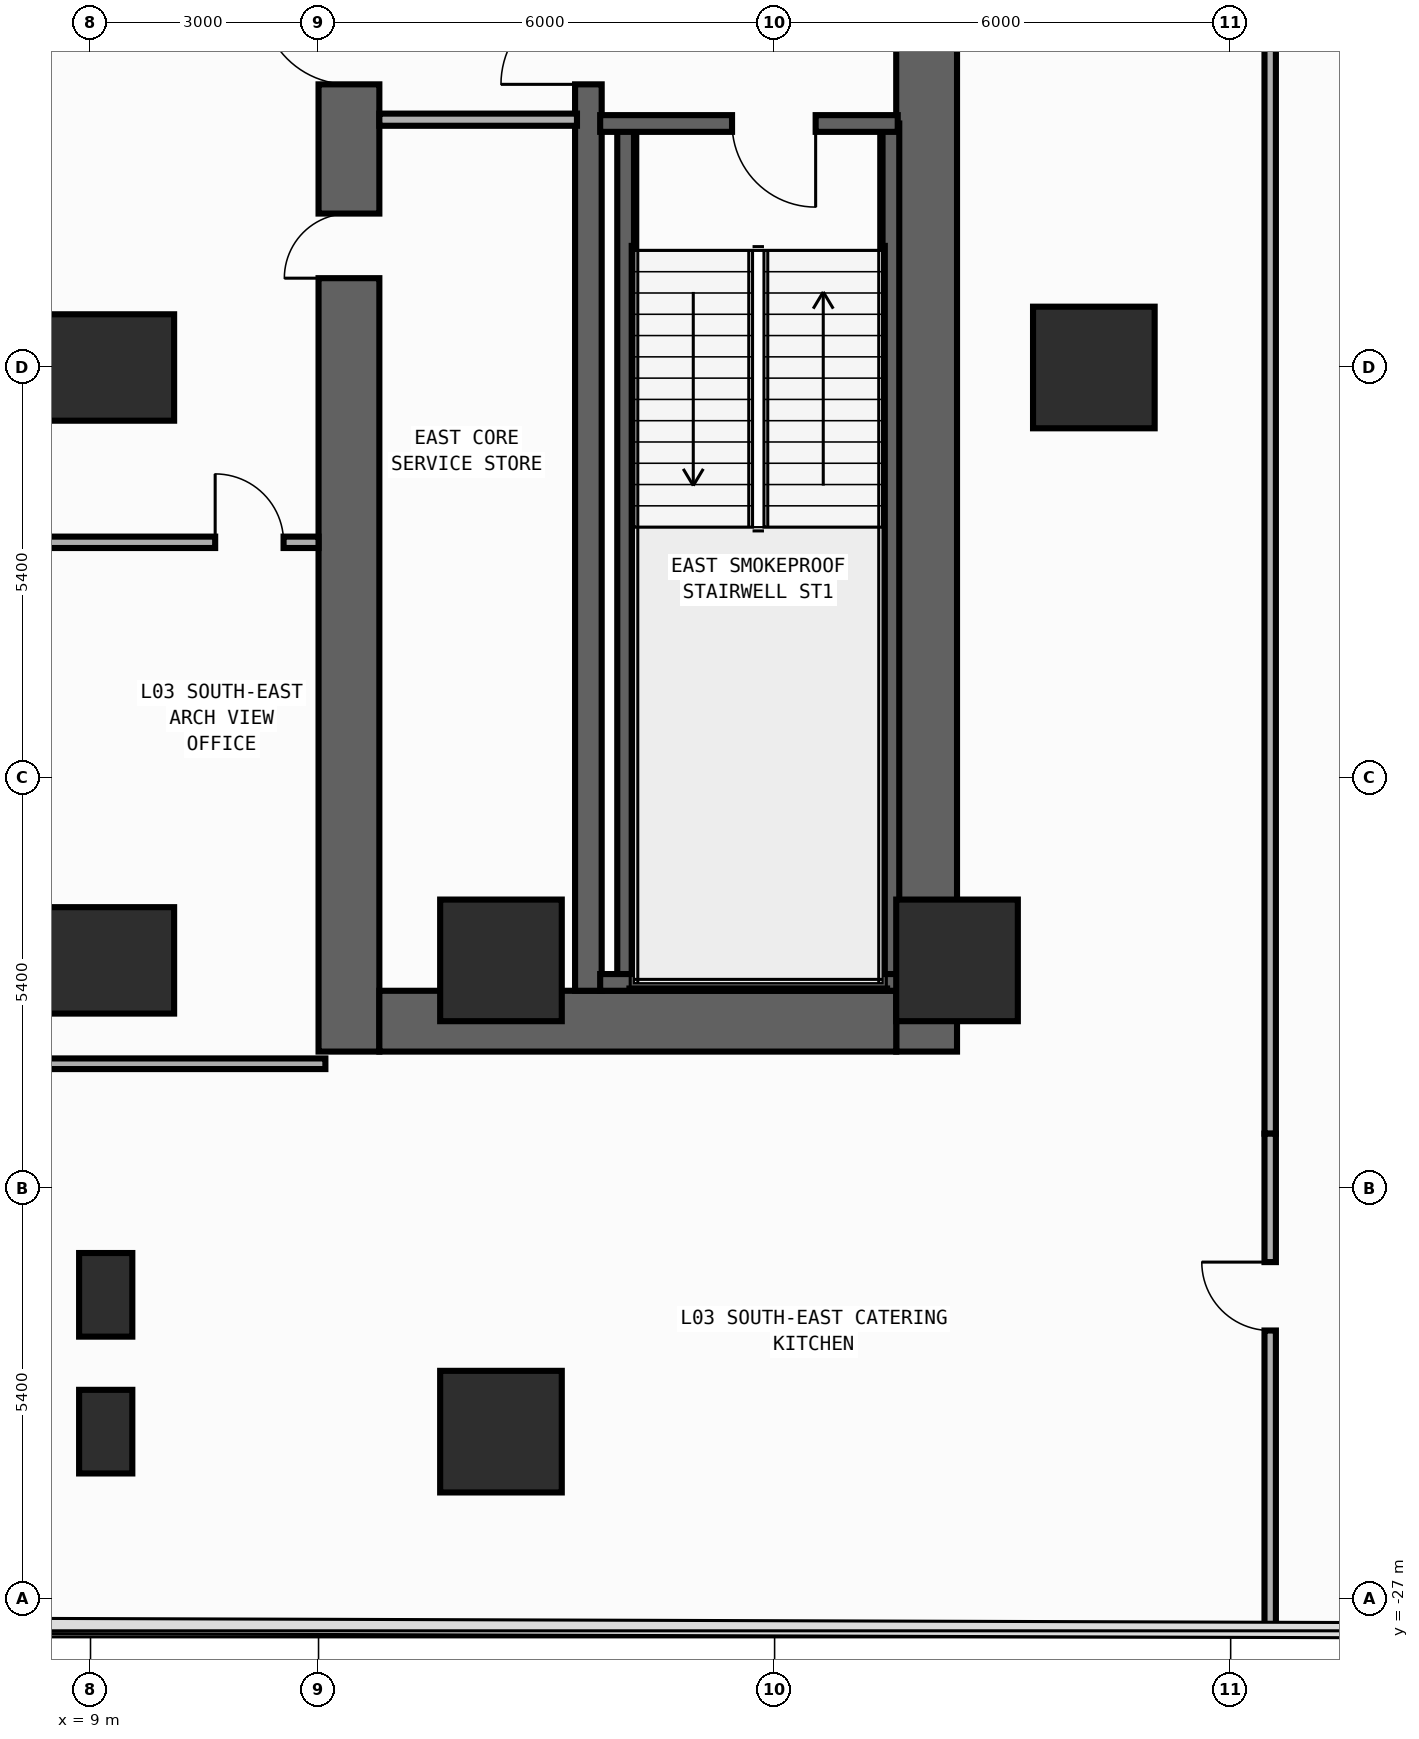
"""IFC4 building model, lengths in metres.
Left out: names, types, materials, properties, quantities, classifications, styles, units other than length and angle.
Written with IfcOpenShell. Run it as: python <this file> out.ifc"""

import sys

from ifc_helpers import new_model, si_unit, direction, frame, frame_2d, origin, origin_2d, place, context, subcontext, project, spatial, rectangle, extrude, element, fill, save


model = new_model("IFC4")
c1 = context("Model", 3, precision=1e-05, world=origin(), true_north=direction((0.0, 1.0)))
c2 = subcontext(c1, "Body", "Model", "MODEL_VIEW")
j1 = project(units=[si_unit("LENGTHUNIT", "METRE"), si_unit("PLANEANGLEUNIT", "RADIAN")], contexts=[c1])
p1 = place(None, origin())
s1 = spatial("IfcSite", under=j1, at=p1, CompositionType="ELEMENT")
p2 = place(p1, origin())
s2 = spatial("IfcBuilding", under=s1, at=p2, CompositionType="ELEMENT")
p3 = place(p2, frame((0.0, 0.0, 11.0)))
s3 = spatial("IfcBuildingStorey", under=s2, at=p3, CompositionType="ELEMENT", Elevation=11.0)
p4 = place(p3, frame((12.4, -19.8, 0.0), z_axis=(0.0, 0.0, 1.0), x_axis=(0.0, 1.0, 0.0)))
e1 = element("IfcWall", 1, at=p4, inside=s3, PredefinedType="SHEAR", context=c2, shape_type="SweptSolid", body=[
    extrude(rectangle(XDim=27.0, YDim=0.8, at=frame_2d((13.5, 0.0))), origin(), (0.0, 0.0, 1.0), 4.7),
])
p5 = place(p4, frame((23.05, 0.0, 0.0)))
e2 = element("IfcOpeningElement", 2, at=p5, cuts=e1, PredefinedType="OPENING", context=c2, shape_type="SweptSolid", body=[
    extrude(rectangle(XDim=1.1, YDim=2.2, at=frame_2d((0.55, 1.1))), frame((0.0, 0.41, 0.0), z_axis=(0.0, -1.0, 0.0), x_axis=(1.0, 0.0, 0.0)), (0.0, 0.0, 1.0), 0.82),
])
p6 = place(p4, frame((19.85, 0.0, 0.0)))
e3 = element("IfcOpeningElement", 3, at=p6, cuts=e1, PredefinedType="OPENING", context=c2, shape_type="SweptSolid", body=[
    extrude(rectangle(XDim=1.1, YDim=2.2, at=frame_2d((0.55, 1.1))), frame((0.0, 0.41, 0.0), z_axis=(0.0, -1.0, 0.0), x_axis=(1.0, 0.0, 0.0)), (0.0, 0.0, 1.0), 0.82),
])
p7 = place(p4, frame((16.65, 0.0, 0.0)))
e4 = element("IfcOpeningElement", 4, at=p7, cuts=e1, PredefinedType="OPENING", context=c2, shape_type="SweptSolid", body=[
    extrude(rectangle(XDim=1.1, YDim=2.2, at=frame_2d((0.55, 1.1))), frame((0.0, 0.41, 0.0), z_axis=(0.0, -1.0, 0.0), x_axis=(1.0, 0.0, 0.0)), (0.0, 0.0, 1.0), 0.82),
])
p8 = place(p4, frame((10.175, 0.0, 0.0)))
e5 = element("IfcOpeningElement", 5, at=p8, cuts=e1, PredefinedType="OPENING", context=c2, shape_type="SweptSolid", body=[
    extrude(rectangle(XDim=0.85, YDim=2.1, at=frame_2d((0.425, 1.05))), frame((0.0, 0.41, 0.0), z_axis=(0.0, -1.0, 0.0), x_axis=(1.0, 0.0, 0.0)), (0.0, 0.0, 1.0), 0.82),
])
p9 = place(p4, frame((12.725, 0.0, 0.0)))
e6 = element("IfcOpeningElement", 6, at=p9, cuts=e1, PredefinedType="OPENING", context=c2, shape_type="SweptSolid", body=[
    extrude(rectangle(XDim=1.15, YDim=2.2, at=frame_2d((0.575, 1.1))), frame((0.0, 0.41, 0.0), z_axis=(0.0, -1.0, 0.0), x_axis=(1.0, 0.0, 0.0)), (0.0, 0.0, 1.0), 0.82),
])
p10 = place(p4, frame((25.125, 0.0, 0.0)))
e7 = element("IfcOpeningElement", 7, at=p10, cuts=e1, PredefinedType="OPENING", context=c2, shape_type="SweptSolid", body=[
    extrude(rectangle(XDim=0.85, YDim=2.1, at=frame_2d((0.425, 1.05))), frame((0.0, 0.41, 0.0), z_axis=(0.0, -1.0, 0.0), x_axis=(1.0, 0.0, 0.0)), (0.0, 0.0, 1.0), 0.82),
])
p11 = place(p3, frame((20.0, -19.8, 0.0), z_axis=(0.0, 0.0, 1.0), x_axis=(0.0, 1.0, 0.0)))
e8 = element("IfcWall", 8, at=p11, inside=s3, PredefinedType="SHEAR", context=c2, shape_type="SweptSolid", body=[
    extrude(rectangle(XDim=27.0, YDim=0.8, at=frame_2d((13.5, 0.0))), origin(), (0.0, 0.0, 1.0), 4.7),
])
p12 = place(p3, frame((12.8, -19.4, 0.0), z_axis=(0.0, 0.0, 1.0), x_axis=(1.0, 0.0, 0.0)))
e9 = element("IfcWall", 9, at=p12, inside=s3, PredefinedType="SHEAR", context=c2, shape_type="SweptSolid", body=[
    extrude(rectangle(XDim=6.8, YDim=0.8, at=frame_2d((3.4, 0.0))), origin(), (0.0, 0.0, 1.0), 4.7),
])
p13 = place(p3, frame((15.55, -19.0, 0.0), z_axis=(0.0, 0.0, 1.0), x_axis=(0.0, 1.0, 0.0)))
e10 = element("IfcWall", 10, at=p13, inside=s3, PredefinedType="SHEAR", context=c2, shape_type="SweptSolid", body=[
    extrude(rectangle(XDim=25.4, YDim=0.35, at=frame_2d((12.7, 0.0))), origin(), (0.0, 0.0, 1.0), 4.7),
])
p14 = place(p13, frame((11.925, 0.0, 0.0)))
e11 = element("IfcOpeningElement", 11, at=p14, cuts=e10, PredefinedType="OPENING", context=c2, shape_type="SweptSolid", body=[
    extrude(rectangle(XDim=1.15, YDim=2.2, at=frame_2d((0.575, 1.1))), frame((0.0, 0.185, 0.0), z_axis=(0.0, -1.0, 0.0), x_axis=(1.0, 0.0, 0.0)), (0.0, 0.0, 1.0), 0.37),
])
p15 = place(p13, frame((24.325, 0.0, 0.0)))
e12 = element("IfcOpeningElement", 12, at=p15, cuts=e10, PredefinedType="OPENING", context=c2, shape_type="SweptSolid", body=[
    extrude(rectangle(XDim=0.85, YDim=2.1, at=frame_2d((0.425, 1.05))), frame((0.0, 0.185, 0.0), z_axis=(0.0, -1.0, 0.0), x_axis=(1.0, 0.0, 0.0)), (0.0, 0.0, 1.0), 0.37),
])
for number, where, z_axis, x_axis in (
    (13, (16.04, -18.89, 0.0), (0.0, 0.0, 1.0), (0.0, 1.0, 0.0)),
    (14, (19.53, -18.89, 0.0), (0.0, 0.0, 1.0), (0.0, 1.0, 0.0)),
):
    element("IfcWall", number, at=place(p3, frame(where, z_axis=z_axis, x_axis=x_axis)), inside=s3, PredefinedType="SHEAR", context=c2, shape_type="SweptSolid", body=[
        extrude(rectangle(XDim=11.3, YDim=0.22, at=frame_2d((5.65, 0.0))), origin(), (0.0, 0.0, 1.0), 4.7),
    ])
p16 = place(p3, frame((15.705, -18.89, 0.0), z_axis=(0.0, 0.0, 1.0), x_axis=(1.0, 0.0, 0.0)))
e15 = element("IfcWall", 15, at=p16, inside=s3, PredefinedType="SHEAR", context=c2, shape_type="SweptSolid", body=[
    extrude(rectangle(XDim=3.915, YDim=0.22, at=frame_2d((1.958, 0.0))), origin(), (0.0, 0.0, 1.0), 4.7),
])
p17 = place(p3, frame((19.62, -7.59, 0.0), z_axis=(0.0, 0.0, 1.0), x_axis=(-1.0, 0.0, 0.0)))
e16 = element("IfcWall", 16, at=p17, inside=s3, PredefinedType="SHEAR", context=c2, shape_type="SweptSolid", body=[
    extrude(rectangle(XDim=3.915, YDim=0.22, at=frame_2d((1.958, 0.0))), origin(), (0.0, 0.0, 1.0), 4.7),
])
p18 = place(p17, frame((1.08, 0.0, 0.0)))
e17 = element("IfcOpeningElement", 17, at=p18, cuts=e16, PredefinedType="OPENING", context=c2, shape_type="SweptSolid", body=[
    extrude(rectangle(XDim=1.1, YDim=2.2, at=frame_2d((0.55, 1.1))), frame((0.0, 0.12, 0.0), z_axis=(0.0, -1.0, 0.0), x_axis=(1.0, 0.0, 0.0)), (0.0, 0.0, 1.0), 0.24),
])
for number, where, z_axis, x_axis in (
    (18, (9.2, -18.6, 0.0), (0.0, 0.0, 1.0), (1.0, 0.0, 0.0)),
    (19, (9.2, -10.8, 0.0), (0.0, 0.0, 1.0), (1.0, 0.0, 0.0)),
):
    element("IfcColumn", number, at=place(p3, frame(where, z_axis=z_axis, x_axis=x_axis)), inside=s3, PredefinedType="COLUMN", context=c2, shape_type="SweptSolid", body=[
        extrude(rectangle(XDim=1.8, YDim=1.4, at=origin_2d()), origin(), (0.0, 0.0, 1.0), 5.0),
    ])
for number, where, z_axis, x_axis in (
    (20, (20.4, -18.6, 0.0), (0.0, 0.0, 1.0), (1.0, 0.0, 0.0)),
    (21, (14.4, -18.6, 0.0), (0.0, 0.0, 1.0), (1.0, 0.0, 0.0)),
):
    element("IfcColumn", number, at=place(p3, frame(where, z_axis=z_axis, x_axis=x_axis)), inside=s3, PredefinedType="COLUMN", context=c2, shape_type="SweptSolid", body=[
        extrude(rectangle(XDim=1.6, YDim=1.6, at=origin_2d()), origin(), (0.0, 0.0, 1.0), 5.0),
    ])
p19 = place(p3, frame((9.2, -24.8, 0.0), z_axis=(0.0, 0.0, 1.0), x_axis=(1.0, 0.0, 0.0)))
e22 = element("IfcColumn", 22, at=p19, inside=s3, PredefinedType="PILASTER", context=c2, shape_type="SweptSolid", body=[
    extrude(rectangle(XDim=0.7, YDim=1.1, at=origin_2d()), origin(), (0.0, 0.0, 1.0), 5.0),
])
for number, where, z_axis, x_axis in (
    (23, (22.2, -10.8, 0.0), (0.0, 0.0, 1.0), (1.0, 0.0, 0.0)),
    (24, (14.4, -24.8, 0.0), (0.0, 0.0, 1.0), (1.0, 0.0, 0.0)),
):
    element("IfcColumn", number, at=place(p3, frame(where, z_axis=z_axis, x_axis=x_axis)), inside=s3, PredefinedType="COLUMN", context=c2, shape_type="SweptSolid", body=[
        extrude(rectangle(XDim=1.6, YDim=1.6, at=origin_2d()), origin(), (0.0, 0.0, 1.0), 5.0),
    ])
p20 = place(p3, frame((9.2, -23.0, 0.0), z_axis=(0.0, 0.0, 1.0), x_axis=(1.0, 0.0, 0.0)))
e25 = element("IfcColumn", 25, at=p20, inside=s3, PredefinedType="PILASTER", context=c2, shape_type="SweptSolid", body=[
    extrude(rectangle(XDim=0.7, YDim=1.1, at=origin_2d()), origin(), (0.0, 0.0, 1.0), 5.0),
])
p21 = place(p3, frame((12.8, -7.54, 0.0), z_axis=(0.0, 0.0, 1.0), x_axis=(1.0, 0.0, 0.0)))
e26 = element("IfcWall", 26, at=p21, inside=s3, PredefinedType="STANDARD", context=c2, shape_type="SweptSolid", body=[
    extrude(rectangle(XDim=2.6, YDim=0.16, at=frame_2d((1.3, 0.0))), origin(), (0.0, 0.0, 1.0), 4.7),
])
p22 = place(p3, frame((8.205, -13.1, 0.0), z_axis=(0.0, 0.0, 1.0), x_axis=(1.0, 0.0, 0.0)))
e27 = element("IfcWall", 27, at=p22, inside=s3, PredefinedType="PARTITIONING", context=c2, shape_type="SweptSolid", body=[
    extrude(rectangle(XDim=3.795, YDim=0.15, at=frame_2d((1.897, 0.0))), origin(), (0.0, 0.0, 1.0), 4.7),
])
p23 = place(p22, frame((2.435, 0.0, 0.0)))
e28 = element("IfcOpeningElement", 28, at=p23, cuts=e27, PredefinedType="OPENING", context=c2, shape_type="SweptSolid", body=[
    extrude(rectangle(XDim=0.9, YDim=2.15, at=frame_2d((0.45, 1.075))), frame((0.0, 0.085, 0.0), z_axis=(0.0, -1.0, 0.0), x_axis=(1.0, 0.0, 0.0)), (0.0, 0.0, 1.0), 0.17),
])
p24 = place(p3, frame((24.52, -20.88, 0.0), z_axis=(0.0, 0.0, 1.0), x_axis=(0.0, 1.0, 0.0)))
e29 = element("IfcWall", 29, at=p24, inside=s3, PredefinedType="PARTITIONING", context=c2, shape_type="SweptSolid", body=[
    extrude(rectangle(XDim=31.275, YDim=0.15, at=frame_2d((15.637, 0.0))), origin(), (0.0, 0.0, 1.0), 4.7),
])
p25 = place(p24, frame((15.087, 0.0, 0.0)))
e30 = element("IfcOpeningElement", 30, at=p25, cuts=e29, PredefinedType="OPENING", context=c2, shape_type="SweptSolid", body=[
    extrude(rectangle(XDim=0.9, YDim=2.15, at=frame_2d((0.45, 1.075))), frame((0.0, 0.085, 0.0), z_axis=(0.0, -1.0, 0.0), x_axis=(1.0, 0.0, 0.0)), (0.0, 0.0, 1.0), 0.17),
])
p26 = place(p3, frame((24.52, -27.413, 0.0), z_axis=(0.0, 0.0, 1.0), x_axis=(0.0, 1.0, 0.0)))
e31 = element("IfcWall", 31, at=p26, inside=s3, PredefinedType="PARTITIONING", context=c2, shape_type="SweptSolid", body=[
    extrude(rectangle(XDim=6.533, YDim=0.15, at=frame_2d((3.266, 0.0))), origin(), (0.0, 0.0, 1.0), 4.7),
])
p27 = place(p26, frame((3.943, 0.0, 0.0)))
e32 = element("IfcOpeningElement", 32, at=p27, cuts=e31, PredefinedType="OPENING", context=c2, shape_type="SweptSolid", body=[
    extrude(rectangle(XDim=0.9, YDim=2.15, at=frame_2d((0.45, 1.075))), frame((0.0, 0.085, 0.0), z_axis=(0.0, -1.0, 0.0), x_axis=(1.0, 0.0, 0.0)), (0.0, 0.0, 1.0), 0.17),
])
p28 = place(p3, frame((8.205, -19.96, 0.0), z_axis=(0.0, 0.0, 1.0), x_axis=(1.0, 0.0, 0.0)))
e33 = element("IfcWall", 33, at=p28, inside=s3, PredefinedType="PARTITIONING", context=c2, shape_type="SweptSolid", body=[
    extrude(rectangle(XDim=3.885, YDim=0.14, at=frame_2d((1.942, 0.0))), origin(), (0.0, 0.0, 1.0), 4.7),
])
p29 = place(p18, origin())
e34 = element("IfcDoor", 34, at=p29, inside=s3, OperationType="SINGLE_SWING_LEFT", PredefinedType="DOOR", context=c2, shape_type="SweptSolid", body=[
    extrude(rectangle(XDim=1.1, YDim=2.2, at=frame_2d((0.55, 1.1))), frame((0.0, 0.025, 0.0), z_axis=(0.0, -1.0, 0.0), x_axis=(1.0, 0.0, 0.0)), (0.0, 0.0, 1.0), 0.05),
])
fill(e17, e34)
p30 = place(p8, origin())
e35 = element("IfcDoor", 35, at=p30, inside=s3, OperationType="SINGLE_SWING_LEFT", PredefinedType="DOOR", context=c2, shape_type="SweptSolid", body=[
    extrude(rectangle(XDim=0.85, YDim=2.1, at=frame_2d((0.425, 1.05))), frame((0.0, 0.025, 0.0), z_axis=(0.0, -1.0, 0.0), x_axis=(1.0, 0.0, 0.0)), (0.0, 0.0, 1.0), 0.05),
])
fill(e5, e35)
p31 = place(p9, origin())
e36 = element("IfcDoor", 36, at=p31, inside=s3, OperationType="SINGLE_SWING_RIGHT", PredefinedType="DOOR", context=c2, shape_type="SweptSolid", body=[
    extrude(rectangle(XDim=1.15, YDim=2.2, at=frame_2d((0.575, 1.1))), frame((0.0, 0.025, 0.0), z_axis=(0.0, -1.0, 0.0), x_axis=(1.0, 0.0, 0.0)), (0.0, 0.0, 1.0), 0.05),
])
fill(e6, e36)
p32 = place(p14, origin())
e37 = element("IfcDoor", 37, at=p32, inside=s3, OperationType="SINGLE_SWING_LEFT", PredefinedType="DOOR", context=c2, shape_type="SweptSolid", body=[
    extrude(rectangle(XDim=1.15, YDim=2.2, at=frame_2d((0.575, 1.1))), frame((0.0, 0.025, 0.0), z_axis=(0.0, -1.0, 0.0), x_axis=(1.0, 0.0, 0.0)), (0.0, 0.0, 1.0), 0.05),
])
fill(e11, e37)
p33 = place(p23, origin())
e38 = element("IfcDoor", 38, at=p33, inside=s3, OperationType="SINGLE_SWING_LEFT", PredefinedType="DOOR", context=c2, shape_type="SweptSolid", body=[
    extrude(rectangle(XDim=0.9, YDim=2.15, at=frame_2d((0.45, 1.075))), frame((0.0, 0.025, 0.0), z_axis=(0.0, -1.0, 0.0), x_axis=(1.0, 0.0, 0.0)), (0.0, 0.0, 1.0), 0.05),
])
fill(e28, e38)
p34 = place(p27, origin())
e39 = element("IfcDoor", 39, at=p34, inside=s3, OperationType="SINGLE_SWING_RIGHT", PredefinedType="DOOR", context=c2, shape_type="SweptSolid", body=[
    extrude(rectangle(XDim=0.9, YDim=2.15, at=frame_2d((0.45, 1.075))), frame((0.0, 0.025, 0.0), z_axis=(0.0, -1.0, 0.0), x_axis=(1.0, 0.0, 0.0)), (0.0, 0.0, 1.0), 0.05),
])
fill(e32, e39)
save(model, sys.argv[1])
